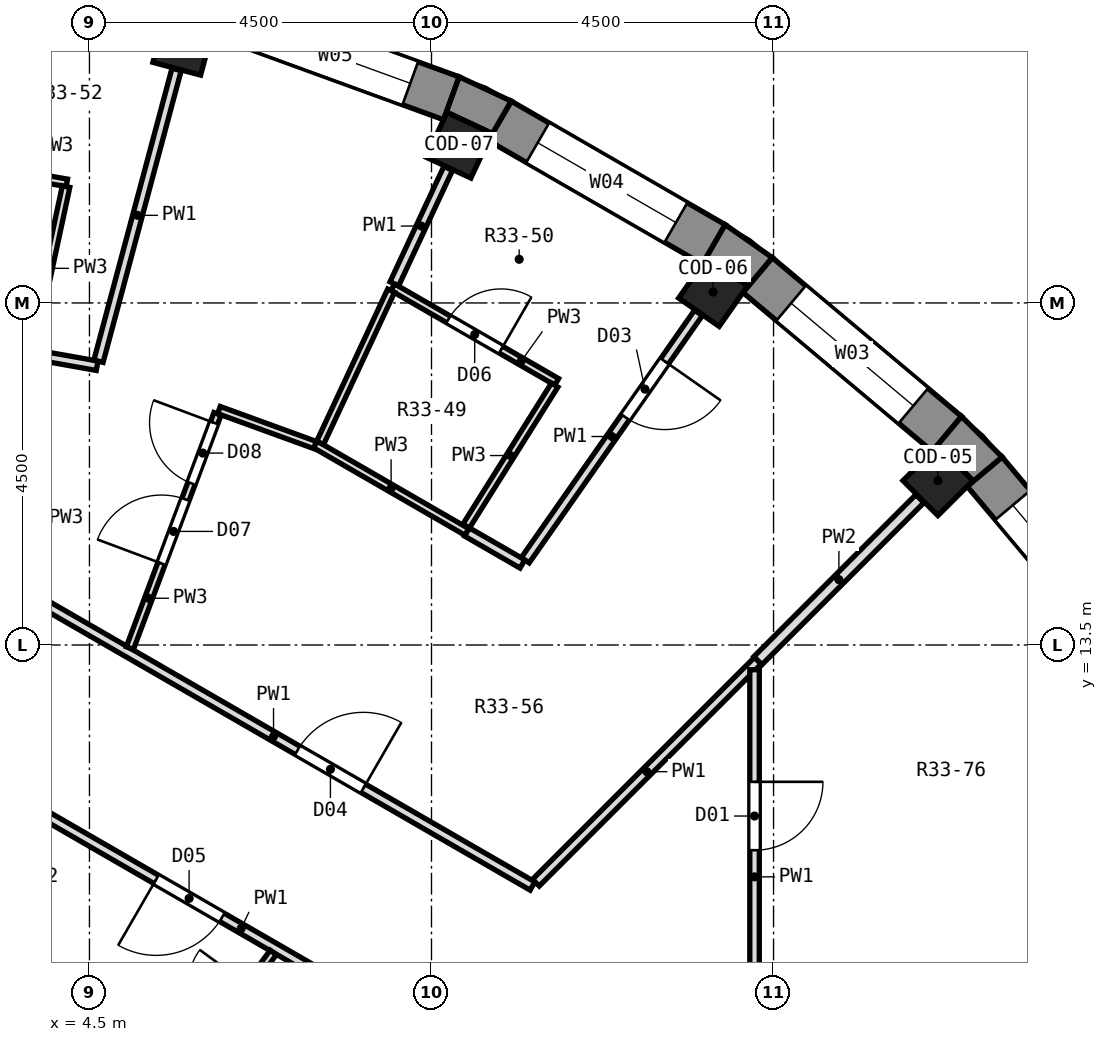
"""IFC4 building model, lengths in metres.
Left out: names, types, materials, properties, quantities, classifications, styles, units other than length and angle.
Written with IfcOpenShell. Run it as: python <this file> out.ifc"""

import sys

from ifc_helpers import new_model, si_unit, direction, frame, frame_2d, origin, origin_2d, place, context, subcontext, project, spatial, polyline, rectangle, outline, extrude, element, fill, save


model = new_model("IFC4")
c1 = context("Model", 3, precision=1e-05, world=origin(), true_north=direction((0.0, 1.0)))
c2 = subcontext(c1, "Body", "Model", "MODEL_VIEW")
j1 = project(units=[si_unit("LENGTHUNIT", "METRE"), si_unit("PLANEANGLEUNIT", "RADIAN")], contexts=[c1])
p1 = place(None, origin())
s1 = spatial("IfcSite", under=j1, at=p1, CompositionType="ELEMENT")
p2 = place(p1, origin())
s2 = spatial("IfcBuilding", under=s1, at=p2, CompositionType="ELEMENT")
p3 = place(p2, frame((0.0, 0.0, 229.7)))
s3 = spatial("IfcBuildingStorey", under=s2, at=p3, CompositionType="ELEMENT", Elevation=229.7)
for number, where, z_axis, x_axis in (
    (1, (15.662, 15.662, 0.0), (0.0, 0.0, 1.0), (0.707, 0.707, 0.0)),
    (2, (12.705, 18.144, 0.0), (0.0, 0.0, 1.0), (0.574, 0.819, 0.0)),
    (3, (9.361, 20.075, 0.0), (0.0, 0.0, 1.0), (0.423, 0.906, 0.0)),
    (4, (5.733, 21.395, 0.0), (0.0, 0.0, 1.0), (0.259, 0.966, 0.0)),
):
    element("IfcColumn", number, at=place(p3, frame(where, z_axis=z_axis, x_axis=x_axis)), inside=s3, PredefinedType="COLUMN", context=c2, shape_type="SweptSolid", body=[
        extrude(rectangle(XDim=0.65, YDim=0.65, at=origin_2d()), origin(), (0.0, 0.0, 1.0), 3.3),
    ])
p4 = place(p3, frame((18.367, 13.29, 0.0), z_axis=(0.0, 0.0, 1.0), x_axis=(-0.64277291405, 0.766056773982, 0.0)))
e5 = element("IfcWall", 5, at=p4, inside=s3, PredefinedType="SOLIDWALL", context=c2, shape_type="SweptSolid", body=[
    extrude(rectangle(XDim=3.252, YDim=0.6, at=frame_2d((1.626, 0.0))), origin(), (0.0, 0.0, 1.0), 2.9),
])
p5 = place(p4, frame((0.576, 0.0, 0.9)))
e6 = element("IfcOpeningElement", 6, at=p5, cuts=e5, PredefinedType="OPENING", context=c2, shape_type="SweptSolid", body=[
    extrude(rectangle(XDim=2.1, YDim=1.8, at=frame_2d((1.05, 0.9))), frame((0.0, 0.312, 0.0), z_axis=(0.0, -1.0, 0.0), x_axis=(1.0, 0.0, 0.0)), (0.0, 0.0, 1.0), 0.624),
])
p6 = place(p3, frame((15.781, 16.277, 0.0), z_axis=(0.0, 0.0, 1.0), x_axis=(-0.766056773982, 0.64277291405, 0.0)))
e7 = element("IfcWall", 7, at=p6, inside=s3, PredefinedType="SOLIDWALL", context=c2, shape_type="SweptSolid", body=[
    extrude(rectangle(XDim=3.252, YDim=0.6, at=frame_2d((1.626, 0.0))), origin(), (0.0, 0.0, 1.0), 2.9),
])
p7 = place(p6, frame((0.576, 0.0, 0.9)))
e8 = element("IfcOpeningElement", 8, at=p7, cuts=e7, PredefinedType="OPENING", context=c2, shape_type="SweptSolid", body=[
    extrude(rectangle(XDim=2.1, YDim=1.8, at=frame_2d((1.05, 0.9))), frame((0.0, 0.312, 0.0), z_axis=(0.0, -1.0, 0.0), x_axis=(1.0, 0.0, 0.0)), (0.0, 0.0, 1.0), 0.624),
])
p8 = place(p3, frame((12.714, 18.77, 0.0), z_axis=(0.0, 0.0, 1.0), x_axis=(-0.866016800201, 0.500014901547, 0.0)))
e9 = element("IfcWall", 9, at=p8, inside=s3, PredefinedType="SOLIDWALL", context=c2, shape_type="SweptSolid", body=[
    extrude(rectangle(XDim=3.252, YDim=0.6, at=frame_2d((1.626, 0.0))), origin(), (0.0, 0.0, 1.0), 2.9),
])
p9 = place(p8, frame((0.576, 0.0, 0.9)))
e10 = element("IfcOpeningElement", 10, at=p9, cuts=e9, PredefinedType="OPENING", context=c2, shape_type="SweptSolid", body=[
    extrude(rectangle(XDim=2.1, YDim=1.8, at=frame_2d((1.05, 0.9))), frame((0.0, 0.312, 0.0), z_axis=(0.0, -1.0, 0.0), x_axis=(1.0, 0.0, 0.0)), (0.0, 0.0, 1.0), 0.624),
])
p10 = place(p3, frame((9.262, 20.693, 0.0), z_axis=(0.0, 0.0, 1.0), x_axis=(-0.939679383794, 0.342056509473, 0.0)))
e11 = element("IfcWall", 11, at=p10, inside=s3, PredefinedType="SOLIDWALL", context=c2, shape_type="SweptSolid", body=[
    extrude(rectangle(XDim=3.252, YDim=0.6, at=frame_2d((1.626, 0.0))), origin(), (0.0, 0.0, 1.0), 2.9),
])
p11 = place(p10, frame((0.576, 0.0, 0.9)))
e12 = element("IfcOpeningElement", 12, at=p11, cuts=e11, PredefinedType="OPENING", context=c2, shape_type="SweptSolid", body=[
    extrude(rectangle(XDim=2.1, YDim=1.8, at=frame_2d((1.05, 0.9))), frame((0.0, 0.312, 0.0), z_axis=(0.0, -1.0, 0.0), x_axis=(1.0, 0.0, 0.0)), (0.0, 0.0, 1.0), 0.624),
])
p12 = place(p3, origin())
e13 = element("IfcWall", 13, at=p12, inside=s3, PredefinedType="SOLIDWALL", context=c2, shape_type="SweptSolid", body=[
    extrude(outline(polyline([(15.973, 16.507), (15.588, 16.047), (15.662, 16.122), (16.122, 15.662), (16.047, 15.588), (16.507, 15.973), (15.973, 16.507)])), origin(), (0.0, 0.0, 1.0), 2.9),
])
p13 = place(p3, origin())
e14 = element("IfcWall", 14, at=p13, inside=s3, PredefinedType="SOLIDWALL", context=c2, shape_type="SweptSolid", body=[
    extrude(outline(polyline([(12.864, 19.03), (12.564, 18.51), (12.625, 18.597), (13.157, 18.224), (13.097, 18.137), (13.482, 18.597), (12.864, 19.03)])), origin(), (0.0, 0.0, 1.0), 2.9),
])
p14 = place(p3, origin())
e15 = element("IfcWall", 15, at=p14, inside=s3, PredefinedType="SOLIDWALL", context=c2, shape_type="SweptSolid", body=[
    extrude(outline(polyline([(10.048, 20.656), (9.364, 20.975), (9.159, 20.411), (9.204, 20.507), (9.793, 20.232), (9.748, 20.136), (10.048, 20.656)])), origin(), (0.0, 0.0, 1.0), 2.9),
])
p15 = place(p3, frame((3.075, 11.746, 0.0), z_axis=(0.0, 0.0, 1.0), x_axis=(0.865983161714, -0.500073158277, 0.0)))
e16 = element("IfcWall", 16, at=p15, inside=s3, PredefinedType="PARTITIONING", context=c2, shape_type="SweptSolid", body=[
    extrude(rectangle(XDim=6.347, YDim=0.125, at=frame_2d((3.174, 0.0))), origin(), (0.0, 0.0, 1.0), 2.9),
])
p16 = place(p15, frame((2.659, 0.0, 0.0)))
e17 = element("IfcOpeningElement", 17, at=p16, cuts=e16, PredefinedType="OPENING", context=c2, shape_type="SweptSolid", body=[
    extrude(rectangle(XDim=1.0, YDim=2.1, at=frame_2d((0.5, 1.05))), frame((0.0, 0.074, 0.0), z_axis=(0.0, -1.0, 0.0), x_axis=(1.0, 0.0, 0.0)), (0.0, 0.0, 1.0), 0.149),
])
p17 = place(p3, frame((3.718, 14.147, 0.0), z_axis=(0.0, 0.0, 1.0), x_axis=(0.866000791713, -0.500042626935, 0.0)))
e18 = element("IfcWall", 18, at=p17, inside=s3, PredefinedType="PARTITIONING", context=c2, shape_type="SweptSolid", body=[
    extrude(rectangle(XDim=7.635, YDim=0.125, at=frame_2d((3.817, 0.0))), origin(), (0.0, 0.0, 1.0), 2.9),
])
p18 = place(p17, frame((4.064, 0.0, 0.0)))
e19 = element("IfcOpeningElement", 19, at=p18, cuts=e18, PredefinedType="OPENING", context=c2, shape_type="SweptSolid", body=[
    extrude(rectangle(XDim=1.0, YDim=2.1, at=frame_2d((0.5, 1.05))), frame((0.0, 0.074, 0.0), z_axis=(0.0, -1.0, 0.0), x_axis=(1.0, 0.0, 0.0)), (0.0, 0.0, 1.0), 0.149),
])
p19 = place(p3, frame((7.47, 16.139, 0.0), z_axis=(0.0, 0.0, 1.0), x_axis=(0.866070948836, -0.499921105357, 0.0)))
e20 = element("IfcWall", 20, at=p19, inside=s3, PredefinedType="PARTITIONING", context=c2, shape_type="SweptSolid", body=[
    extrude(rectangle(XDim=2.305, YDim=0.1, at=frame_2d((1.152, 0.0))), origin(), (0.0, 0.0, 1.0), 2.9),
])
p20 = place(p3, frame((9.466, 14.987, 0.0), z_axis=(0.0, 0.0, 1.0), x_axis=(0.866185586049, -0.49972245349, 0.0)))
e21 = element("IfcWall", 21, at=p20, inside=s3, PredefinedType="PARTITIONING", context=c2, shape_type="SweptSolid", body=[
    extrude(rectangle(XDim=0.843, YDim=0.125, at=frame_2d((0.421, 0.0))), origin(), (0.0, 0.0, 1.0), 2.9),
])
p21 = place(p3, frame((8.49, 18.207, 0.0), z_axis=(0.0, 0.0, 1.0), x_axis=(0.866063163075, -0.499934593286, 0.0)))
e22 = element("IfcWall", 22, at=p21, inside=s3, PredefinedType="PARTITIONING", context=c2, shape_type="SweptSolid", body=[
    extrude(rectangle(XDim=2.49, YDim=0.1, at=frame_2d((1.245, 0.0))), origin(), (0.0, 0.0, 1.0), 2.9),
])
p22 = place(p21, frame((0.845, 0.0, 0.0)))
e23 = element("IfcOpeningElement", 23, at=p22, cuts=e22, PredefinedType="OPENING", context=c2, shape_type="SweptSolid", body=[
    extrude(rectangle(XDim=0.8, YDim=2.1, at=frame_2d((0.4, 1.05))), frame((0.0, 0.062, 0.0), z_axis=(0.0, -1.0, 0.0), x_axis=(1.0, 0.0, 0.0)), (0.0, 0.0, 1.0), 0.124),
])
p23 = place(p3, frame((6.204, 16.591, 0.0), z_axis=(0.0, 0.0, 1.0), x_axis=(0.939623600186, -0.342209716364, 0.0)))
e24 = element("IfcWall", 24, at=p23, inside=s3, PredefinedType="PARTITIONING", context=c2, shape_type="SweptSolid", body=[
    extrude(rectangle(XDim=1.344, YDim=0.1, at=frame_2d((0.672, 0.0))), origin(), (0.0, 0.0, 1.0), 2.9),
])
p24 = place(p3, frame((3.769, 17.321, 0.0), z_axis=(0.0, 0.0, 1.0), x_axis=(0.984637698915, -0.174609856179, 0.0)))
e25 = element("IfcWall", 25, at=p24, inside=s3, PredefinedType="PARTITIONING", context=c2, shape_type="SweptSolid", body=[
    extrude(rectangle(XDim=0.844, YDim=0.125, at=frame_2d((0.422, 0.0))), origin(), (0.0, 0.0, 1.0), 2.9),
])
p25 = place(p3, frame((1.751, 20.012, 0.0), z_axis=(0.0, 0.0, 1.0), x_axis=(0.984838792384, -0.173472052547, 0.0)))
e26 = element("IfcWall", 26, at=p25, inside=s3, PredefinedType="PARTITIONING", context=c2, shape_type="SweptSolid", body=[
    extrude(rectangle(XDim=2.49, YDim=0.1, at=frame_2d((1.245, 0.0))), origin(), (0.0, 0.0, 1.0), 2.9),
])
p26 = place(p25, frame((0.845, 0.0, 0.0)))
e27 = element("IfcOpeningElement", 27, at=p26, cuts=e26, PredefinedType="OPENING", context=c2, shape_type="SweptSolid", body=[
    extrude(rectangle(XDim=0.8, YDim=2.1, at=frame_2d((0.4, 1.05))), frame((0.0, 0.062, 0.0), z_axis=(0.0, -1.0, 0.0), x_axis=(1.0, 0.0, 0.0)), (0.0, 0.0, 1.0), 0.124),
])
p27 = place(p3, frame((10.373, 10.373, 0.0), z_axis=(0.0, 0.0, 1.0), x_axis=(0.707106781187, 0.707106781187, 0.0)))
e28 = element("IfcWall", 28, at=p27, inside=s3, PredefinedType="PARTITIONING", context=c2, shape_type="SweptSolid", body=[
    extrude(rectangle(XDim=4.131, YDim=0.125, at=frame_2d((2.065, 0.0))), origin(), (0.0, 0.0, 1.0), 2.9),
])
p28 = place(p3, frame((13.294, 13.294, 0.0), z_axis=(0.0, 0.0, 1.0), x_axis=(0.707106781187, 0.707106781187, 0.0)))
e29 = element("IfcWall", 29, at=p28, inside=s3, PredefinedType="PARTITIONING", context=c2, shape_type="SweptSolid", body=[
    extrude(rectangle(XDim=3.014, YDim=0.15, at=frame_2d((1.507, 0.0))), origin(), (0.0, 0.0, 1.0), 2.9),
])
p29 = place(p3, frame((5.797, 7.922, 0.0), z_axis=(0.0, 0.0, 1.0), x_axis=(0.59039359818, 0.807115480726, 0.0)))
e30 = element("IfcWall", 30, at=p29, inside=s3, PredefinedType="PARTITIONING", context=c2, shape_type="SweptSolid", body=[
    extrude(rectangle(XDim=1.899, YDim=0.1, at=frame_2d((0.95, 0.0))), origin(), (0.0, 0.0, 1.0), 2.9),
])
p30 = place(p29, frame((0.556, 0.0, 0.0)))
e31 = element("IfcOpeningElement", 31, at=p30, cuts=e30, PredefinedType="OPENING", context=c2, shape_type="SweptSolid", body=[
    extrude(rectangle(XDim=0.8, YDim=2.1, at=frame_2d((0.4, 1.05))), frame((0.0, 0.062, 0.0), z_axis=(0.0, -1.0, 0.0), x_axis=(1.0, 0.0, 0.0)), (0.0, 0.0, 1.0), 0.124),
])
p31 = place(p3, frame((10.234, 14.616, 0.0), z_axis=(0.0, 0.0, 1.0), x_axis=(0.573631457717, 0.81911351516, 0.0)))
e32 = element("IfcWall", 32, at=p31, inside=s3, PredefinedType="PARTITIONING", context=c2, shape_type="SweptSolid", body=[
    extrude(rectangle(XDim=3.972, YDim=0.125, at=frame_2d((1.986, 0.0))), origin(), (0.0, 0.0, 1.0), 2.9),
])
p32 = place(p31, frame((2.296, 0.0, 0.0)))
e33 = element("IfcOpeningElement", 33, at=p32, cuts=e32, PredefinedType="OPENING", context=c2, shape_type="SweptSolid", body=[
    extrude(rectangle(XDim=0.9, YDim=2.1, at=frame_2d((0.45, 1.05))), frame((0.0, 0.074, 0.0), z_axis=(0.0, -1.0, 0.0), x_axis=(1.0, 0.0, 0.0)), (0.0, 0.0, 1.0), 0.149),
])
p33 = place(p3, frame((9.456, 15.065, 0.0), z_axis=(0.0, 0.0, 1.0), x_axis=(0.531591455813, 0.847000899708, 0.0)))
e34 = element("IfcWall", 34, at=p33, inside=s3, PredefinedType="PARTITIONING", context=c2, shape_type="SweptSolid", body=[
    extrude(rectangle(XDim=2.19, YDim=0.1, at=frame_2d((1.095, 0.0))), origin(), (0.0, 0.0, 1.0), 2.9),
])
p34 = place(p3, frame((7.535, 16.159, 0.0), z_axis=(0.0, 0.0, 1.0), x_axis=(0.422601095784, 0.906315791456, 0.0)))
e35 = element("IfcWall", 35, at=p34, inside=s3, PredefinedType="PARTITIONING", context=c2, shape_type="SweptSolid", body=[
    extrude(rectangle(XDim=2.209, YDim=0.1, at=frame_2d((1.104, 0.0))), origin(), (0.0, 0.0, 1.0), 2.9),
])
p35 = place(p3, frame((8.511, 18.252, 0.0), z_axis=(0.0, 0.0, 1.0), x_axis=(0.422749886817, 0.906246397618, 0.0)))
e36 = element("IfcWall", 36, at=p35, inside=s3, PredefinedType="PARTITIONING", context=c2, shape_type="SweptSolid", body=[
    extrude(rectangle(XDim=1.676, YDim=0.125, at=frame_2d((0.838, 0.0))), origin(), (0.0, 0.0, 1.0), 2.9),
])
p36 = place(p3, frame((5.032, 13.459, 0.0), z_axis=(0.0, 0.0, 1.0), x_axis=(0.350375066682, 0.936609477129, 0.0)))
e37 = element("IfcWall", 37, at=p36, inside=s3, PredefinedType="PARTITIONING", context=c2, shape_type="SweptSolid", body=[
    extrude(rectangle(XDim=3.29, YDim=0.1, at=frame_2d((1.645, 0.0))), origin(), (0.0, 0.0, 1.0), 2.9),
])
p37 = place(p36, frame((1.189, 0.0, 0.0)))
e38 = element("IfcOpeningElement", 38, at=p37, cuts=e37, PredefinedType="OPENING", context=c2, shape_type="SweptSolid", body=[
    extrude(rectangle(XDim=0.9, YDim=2.1, at=frame_2d((0.45, 1.05))), frame((0.0, 0.062, 0.0), z_axis=(0.0, -1.0, 0.0), x_axis=(1.0, 0.0, 0.0)), (0.0, 0.0, 1.0), 0.124),
])
p38 = place(p36, frame((2.314, 0.0, 0.0)))
e39 = element("IfcOpeningElement", 39, at=p38, cuts=e37, PredefinedType="OPENING", context=c2, shape_type="SweptSolid", body=[
    extrude(rectangle(XDim=0.85, YDim=2.1, at=frame_2d((0.425, 1.05))), frame((0.0, 0.062, 0.0), z_axis=(0.0, -1.0, 0.0), x_axis=(1.0, 0.0, 0.0)), (0.0, 0.0, 1.0), 0.124),
])
p39 = place(p3, frame((4.619, 17.234, 0.0), z_axis=(0.0, 0.0, 1.0), x_axis=(0.258553809463, 0.965996856937, 0.0)))
e40 = element("IfcWall", 40, at=p39, inside=s3, PredefinedType="PARTITIONING", context=c2, shape_type="SweptSolid", body=[
    extrude(rectangle(XDim=3.972, YDim=0.125, at=frame_2d((1.986, 0.0))), origin(), (0.0, 0.0, 1.0), 2.9),
])
p40 = place(p3, frame((3.73, 17.379, 0.0), z_axis=(0.0, 0.0, 1.0), x_axis=(0.209960822615, 0.977709799975, 0.0)))
e41 = element("IfcWall", 41, at=p40, inside=s3, PredefinedType="PARTITIONING", context=c2, shape_type="SweptSolid", body=[
    extrude(rectangle(XDim=2.201, YDim=0.1, at=frame_2d((1.101, 0.0))), origin(), (0.0, 0.0, 1.0), 2.9),
])
p41 = place(p3, frame((13.25, 9.25, 0.0), z_axis=(0.0, 0.0, 1.0), x_axis=(0.0, 1.0, 0.0)))
e42 = element("IfcWall", 42, at=p41, inside=s3, PredefinedType="PARTITIONING", context=c2, shape_type="SweptSolid", body=[
    extrude(rectangle(XDim=3.925, YDim=0.125, at=frame_2d((1.962, 0.0))), origin(), (0.0, 0.0, 1.0), 2.9),
])
p42 = place(p41, frame((1.55, 0.0, 0.0)))
e43 = element("IfcOpeningElement", 43, at=p42, cuts=e42, PredefinedType="OPENING", context=c2, shape_type="SweptSolid", body=[
    extrude(rectangle(XDim=0.9, YDim=2.1, at=frame_2d((0.45, 1.05))), frame((0.0, 0.074, 0.0), z_axis=(0.0, -1.0, 0.0), x_axis=(1.0, 0.0, 0.0)), (0.0, 0.0, 1.0), 0.149),
])
p43 = place(p5, origin())
e44 = element("IfcWindow", 44, at=p43, inside=s3, PartitioningType="SINGLE_PANEL", PredefinedType="WINDOW", context=c2, shape_type="SweptSolid", body=[
    extrude(rectangle(XDim=2.1, YDim=1.8, at=frame_2d((1.05, 0.9))), frame((0.0, 0.18, 0.0), z_axis=(0.0, -1.0, 0.0), x_axis=(1.0, 0.0, 0.0)), (0.0, 0.0, 1.0), 0.06),
])
fill(e6, e44)
p44 = place(p7, origin())
e45 = element("IfcWindow", 45, at=p44, inside=s3, PartitioningType="SINGLE_PANEL", PredefinedType="WINDOW", context=c2, shape_type="SweptSolid", body=[
    extrude(rectangle(XDim=2.1, YDim=1.8, at=frame_2d((1.05, 0.9))), frame((0.0, 0.18, 0.0), z_axis=(0.0, -1.0, 0.0), x_axis=(1.0, 0.0, 0.0)), (0.0, 0.0, 1.0), 0.06),
])
fill(e8, e45)
p45 = place(p9, origin())
e46 = element("IfcWindow", 46, at=p45, inside=s3, PartitioningType="SINGLE_PANEL", PredefinedType="WINDOW", context=c2, shape_type="SweptSolid", body=[
    extrude(rectangle(XDim=2.1, YDim=1.8, at=frame_2d((1.05, 0.9))), frame((0.0, 0.18, 0.0), z_axis=(0.0, -1.0, 0.0), x_axis=(1.0, 0.0, 0.0)), (0.0, 0.0, 1.0), 0.06),
])
fill(e10, e46)
p46 = place(p11, origin())
e47 = element("IfcWindow", 47, at=p46, inside=s3, PartitioningType="SINGLE_PANEL", PredefinedType="WINDOW", context=c2, shape_type="SweptSolid", body=[
    extrude(rectangle(XDim=2.1, YDim=1.8, at=frame_2d((1.05, 0.9))), frame((0.0, 0.18, 0.0), z_axis=(0.0, -1.0, 0.0), x_axis=(1.0, 0.0, 0.0)), (0.0, 0.0, 1.0), 0.06),
])
fill(e12, e47)
p47 = place(p42, frame((0.9, 0.0, 0.0), z_axis=(0.0, 0.0, 1.0), x_axis=(-1.0, 0.0, 0.0)))
e48 = element("IfcDoor", 48, at=p47, inside=s3, OperationType="SINGLE_SWING_LEFT", PredefinedType="DOOR", context=c2, shape_type="SweptSolid", body=[
    extrude(rectangle(XDim=0.9, YDim=2.1, at=frame_2d((0.45, 1.05))), frame((0.0, 0.025, 0.0), z_axis=(0.0, -1.0, 0.0), x_axis=(1.0, 0.0, 0.0)), (0.0, 0.0, 1.0), 0.05),
])
fill(e43, e48)
p48 = place(p32, frame((0.9, 0.0, 0.0), z_axis=(0.0, 0.0, 1.0), x_axis=(-1.0, 0.0, 0.0)))
e49 = element("IfcDoor", 49, at=p48, inside=s3, OperationType="SINGLE_SWING_LEFT", PredefinedType="DOOR", context=c2, shape_type="SweptSolid", body=[
    extrude(rectangle(XDim=0.9, YDim=2.1, at=frame_2d((0.45, 1.05))), frame((0.0, 0.025, 0.0), z_axis=(0.0, -1.0, 0.0), x_axis=(1.0, 0.0, 0.0)), (0.0, 0.0, 1.0), 0.05),
])
fill(e33, e49)
p49 = place(p18, origin())
e50 = element("IfcDoor", 50, at=p49, inside=s3, OperationType="SINGLE_SWING_RIGHT", PredefinedType="DOOR", context=c2, shape_type="SweptSolid", body=[
    extrude(rectangle(XDim=1.0, YDim=2.1, at=frame_2d((0.5, 1.05))), frame((0.0, 0.025, 0.0), z_axis=(0.0, -1.0, 0.0), x_axis=(1.0, 0.0, 0.0)), (0.0, 0.0, 1.0), 0.05),
])
fill(e19, e50)
p50 = place(p16, frame((1.0, 0.0, 0.0), z_axis=(0.0, 0.0, 1.0), x_axis=(-1.0, 0.0, 0.0)))
e51 = element("IfcDoor", 51, at=p50, inside=s3, OperationType="SINGLE_SWING_RIGHT", PredefinedType="DOOR", context=c2, shape_type="SweptSolid", body=[
    extrude(rectangle(XDim=1.0, YDim=2.1, at=frame_2d((0.5, 1.05))), frame((0.0, 0.025, 0.0), z_axis=(0.0, -1.0, 0.0), x_axis=(1.0, 0.0, 0.0)), (0.0, 0.0, 1.0), 0.05),
])
fill(e17, e51)
p51 = place(p22, origin())
e52 = element("IfcDoor", 52, at=p51, inside=s3, OperationType="SINGLE_SWING_RIGHT", PredefinedType="DOOR", context=c2, shape_type="SweptSolid", body=[
    extrude(rectangle(XDim=0.8, YDim=2.1, at=frame_2d((0.4, 1.05))), frame((0.0, 0.025, 0.0), z_axis=(0.0, -1.0, 0.0), x_axis=(1.0, 0.0, 0.0)), (0.0, 0.0, 1.0), 0.05),
])
fill(e23, e52)
p52 = place(p37, origin())
e53 = element("IfcDoor", 53, at=p52, inside=s3, OperationType="SINGLE_SWING_LEFT", PredefinedType="DOOR", context=c2, shape_type="SweptSolid", body=[
    extrude(rectangle(XDim=0.9, YDim=2.1, at=frame_2d((0.45, 1.05))), frame((0.0, 0.025, 0.0), z_axis=(0.0, -1.0, 0.0), x_axis=(1.0, 0.0, 0.0)), (0.0, 0.0, 1.0), 0.05),
])
fill(e38, e53)
p53 = place(p38, origin())
e54 = element("IfcDoor", 54, at=p53, inside=s3, OperationType="SINGLE_SWING_RIGHT", PredefinedType="DOOR", context=c2, shape_type="SweptSolid", body=[
    extrude(rectangle(XDim=0.85, YDim=2.1, at=frame_2d((0.425, 1.05))), frame((0.0, 0.025, 0.0), z_axis=(0.0, -1.0, 0.0), x_axis=(1.0, 0.0, 0.0)), (0.0, 0.0, 1.0), 0.05),
])
fill(e39, e54)
save(model, sys.argv[1])
